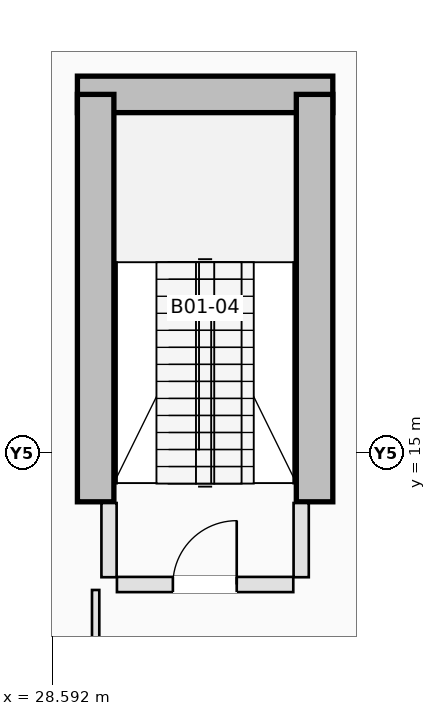
"""IFC4 building model, lengths in metres.
Left out: names, types, materials, properties, quantities, classifications, styles, units other than length and angle.
Written with IfcOpenShell. Run it as: python <this file> out.ifc"""

import sys

from ifc_helpers import new_model, si_unit, direction, frame, frame_2d, origin, place, context, subcontext, project, spatial, rectangle, extrude, element, fill, save


model = new_model("IFC4")
c1 = context("Model", 3, precision=1e-05, world=origin(), true_north=direction((0.0, 1.0)))
c2 = subcontext(c1, "Body", "Model", "MODEL_VIEW")
j1 = project(units=[si_unit("LENGTHUNIT", "METRE"), si_unit("PLANEANGLEUNIT", "RADIAN")], contexts=[c1])
p1 = place(None, origin())
s1 = spatial("IfcSite", under=j1, at=p1, CompositionType="ELEMENT")
p2 = place(p1, origin())
s2 = spatial("IfcBuilding", under=s1, at=p2, CompositionType="ELEMENT")
p3 = place(p2, frame((0.0, 0.0, -5.0)))
s3 = spatial("IfcBuildingStorey", under=s2, at=p3, CompositionType="ELEMENT", Elevation=-5.0)
p4 = place(p3, frame((29.0, 20.9, 0.0), z_axis=(0.0, 0.0, 1.0), x_axis=(1.0, 0.0, 0.0)))
e1 = element("IfcWall", 1, at=p4, inside=s3, PredefinedType="SHEAR", context=c2, shape_type="SweptSolid", body=[
    extrude(rectangle(XDim=4.2, YDim=0.6, at=frame_2d((2.1, 0.0))), origin(), (0.0, 0.0, 1.0), 5.0),
])
for number, where, z_axis, x_axis in (
    (2, (29.3, 14.2, 0.0), (0.0, 0.0, 1.0), (0.0, 1.0, 0.0)),
    (3, (32.9, 14.2, 0.0), (0.0, 0.0, 1.0), (0.0, 1.0, 0.0)),
):
    element("IfcWall", number, at=place(p3, frame(where, z_axis=z_axis, x_axis=x_axis)), inside=s3, PredefinedType="SHEAR", context=c2, shape_type="SweptSolid", body=[
        extrude(rectangle(XDim=6.7, YDim=0.6, at=frame_2d((3.35, 0.0))), origin(), (0.0, 0.0, 1.0), 5.0),
    ])
p5 = place(p3, frame((29.65, 12.84, 0.0), z_axis=(0.0, 0.0, 1.0), x_axis=(1.0, 0.0, 0.0)))
e4 = element("IfcWall", 4, at=p5, inside=s3, PredefinedType="PARTITIONING", context=c2, shape_type="SweptSolid", body=[
    extrude(rectangle(XDim=2.9, YDim=0.25, at=frame_2d((1.45, 0.0))), origin(), (0.0, 0.0, 1.0), 4.7),
])
p6 = place(p5, frame((0.92, 0.0, 0.0)))
e5 = element("IfcOpeningElement", 5, at=p6, cuts=e4, PredefinedType="OPENING", context=c2, shape_type="SweptSolid", body=[
    extrude(rectangle(XDim=1.05, YDim=2.15, at=frame_2d((0.525, 1.075))), frame((0.0, 0.135, 0.0), z_axis=(0.0, -1.0, 0.0), x_axis=(1.0, 0.0, 0.0)), (0.0, 0.0, 1.0), 0.27),
])
for number, where, z_axis, x_axis in (
    (6, (29.52, 12.96, 0.0), (0.0, 0.0, 1.0), (0.0, 1.0, 0.0)),
    (7, (32.68, 12.96, 0.0), (0.0, 0.0, 1.0), (0.0, 1.0, 0.0)),
):
    element("IfcWall", number, at=place(p3, frame(where, z_axis=z_axis, x_axis=x_axis)), inside=s3, PredefinedType="PARTITIONING", context=c2, shape_type="SweptSolid", body=[
        extrude(rectangle(XDim=1.22, YDim=0.25, at=frame_2d((0.61, 0.0))), origin(), (0.0, 0.0, 1.0), 4.7),
    ])
p7 = place(p3, frame((29.3, -2.338, 0.0), z_axis=(0.0, 0.0, 1.0), x_axis=(0.0, 1.0, 0.0)))
e8 = element("IfcWall", 8, at=p7, inside=s3, PredefinedType="PARTITIONING", context=c2, shape_type="SweptSolid", body=[
    extrude(rectangle(XDim=15.088, YDim=0.12, at=frame_2d((7.544, 0.0))), origin(), (0.0, 0.0, 1.0), 4.7),
])
p8 = place(p6, origin())
e9 = element("IfcDoor", 9, at=p8, inside=s3, OperationType="SINGLE_SWING_RIGHT", PredefinedType="DOOR", context=c2, shape_type="SweptSolid", body=[
    extrude(rectangle(XDim=1.05, YDim=2.15, at=frame_2d((0.525, 1.075))), frame((0.0, 0.025, 0.0), z_axis=(0.0, -1.0, 0.0), x_axis=(1.0, 0.0, 0.0)), (0.0, 0.0, 1.0), 0.05),
])
fill(e5, e9)
save(model, sys.argv[1])
